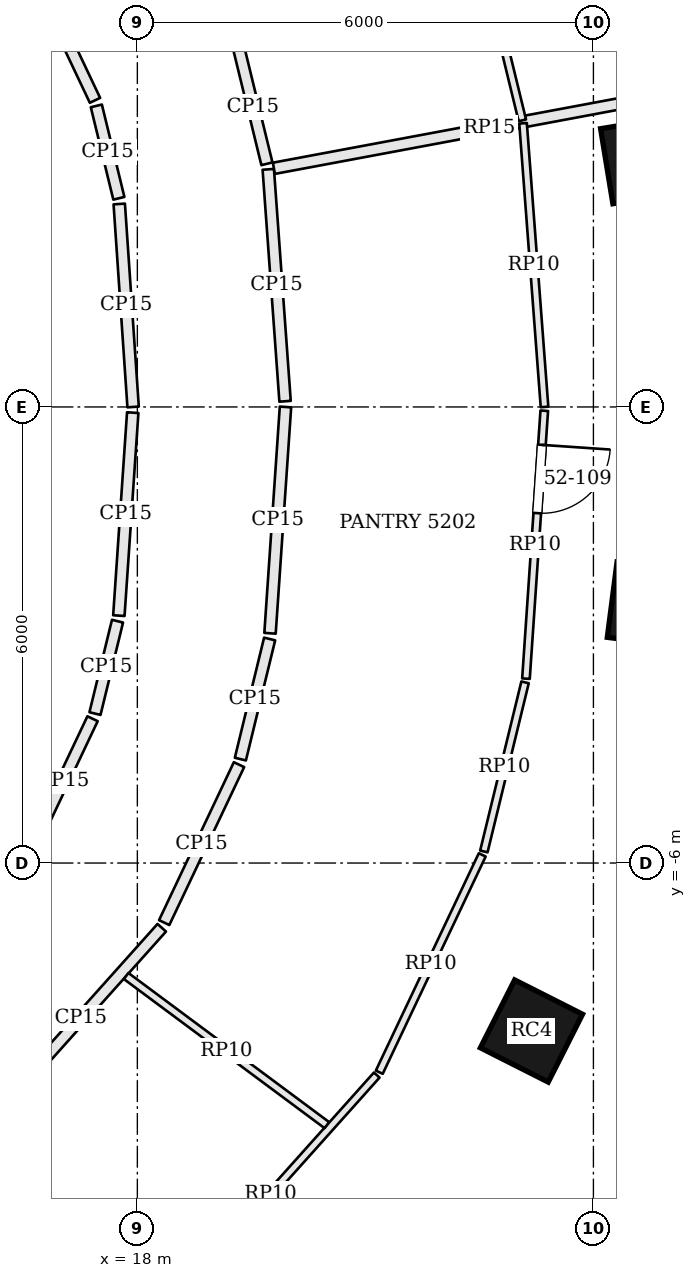
"""IFC4 building model, lengths in metres.
Left out: names, types, materials, properties, quantities, classifications, styles, units other than length and angle.
Written with IfcOpenShell. Run it as: python <this file> out.ifc"""

import sys

from ifc_helpers import new_model, si_unit, direction, frame, frame_2d, origin, origin_2d, place, context, subcontext, project, spatial, rectangle, extrude, element, fill, save


model = new_model("IFC4")
c1 = context("Model", 3, precision=1e-05, world=origin(), true_north=direction((0.0, 1.0)))
c2 = subcontext(c1, "Body", "Model", "MODEL_VIEW")
j1 = project(units=[si_unit("LENGTHUNIT", "METRE"), si_unit("PLANEANGLEUNIT", "RADIAN")], contexts=[c1])
p1 = place(None, origin())
s1 = spatial("IfcSite", under=j1, at=p1, CompositionType="ELEMENT")
p2 = place(p1, origin())
s2 = spatial("IfcBuilding", under=s1, at=p2, CompositionType="ELEMENT")
p3 = place(p2, frame((0.0, 0.0, 213.0)))
s3 = spatial("IfcBuildingStorey", under=s2, at=p3, CompositionType="ELEMENT", Elevation=213.0)
for number, where, z_axis, x_axis in (
    (1, (24.669, 3.248, 0.0), (0.0, 0.0, 1.0), (-0.162, 0.987, 0.0)),
    (2, (23.185, -8.21, 0.0), (0.0, 0.0, 1.0), (0.451, 0.893, 0.0)),
    (3, (24.743, -2.599, 0.0), (0.0, 0.0, 1.0), (0.128, 0.992, 0.0)),
):
    element("IfcColumn", number, at=place(p3, frame(where, z_axis=z_axis, x_axis=x_axis)), inside=s3, PredefinedType="COLUMN", context=c2, shape_type="SweptSolid", body=[
        extrude(rectangle(XDim=1.0, YDim=1.0, at=origin_2d()), origin(), (0.0, 0.0, 1.0), 3.9),
    ])
p4 = place(p3, frame((23.368, -11.701, 0.0), z_axis=(0.0, 0.0, 1.0), x_axis=(0.850251408633, 0.526376806211, 0.0)))
e4 = element("IfcWall", 4, at=p4, inside=s3, PredefinedType="SOLIDWALL", context=c2, shape_type="SweptSolid", body=[
    extrude(rectangle(XDim=5.302, YDim=0.45, at=frame_2d((2.651, 0.0))), origin(), (0.0, 0.0, 1.0), 3.6),
])
p5 = place(p4, frame((1.601, 0.0, 0.9)))
e5 = element("IfcOpeningElement", 5, at=p5, cuts=e4, PredefinedType="OPENING", context=c2, shape_type="SweptSolid", body=[
    extrude(rectangle(XDim=2.1, YDim=1.8, at=frame_2d((1.05, 0.9))), frame((0.0, 0.235, 0.0), z_axis=(0.0, -1.0, 0.0), x_axis=(1.0, 0.0, 0.0)), (0.0, 0.0, 1.0), 0.47),
])
p6 = place(p3, frame((16.193, -9.229, 0.0), z_axis=(0.0, 0.0, 1.0), x_axis=(0.666882089048, 0.745163256815, 0.0)))
e6 = element("IfcWall", 6, at=p6, inside=s3, PredefinedType="PARTITIONING", context=c2, shape_type="SweptSolid", body=[
    extrude(rectangle(XDim=3.19, YDim=0.15, at=frame_2d((1.595, 0.0))), origin(), (0.0, 0.0, 1.0), 2.984),
])
p7 = place(p3, frame((18.353, -6.784, 0.0), z_axis=(0.0, 0.0, 1.0), x_axis=(0.428086344739, 0.903737838894, 0.0)))
e7 = element("IfcWall", 7, at=p7, inside=s3, PredefinedType="PARTITIONING", context=c2, shape_type="SweptSolid", body=[
    extrude(rectangle(XDim=2.3, YDim=0.15, at=frame_2d((1.15, 0.0))), origin(), (0.0, 0.0, 1.0), 2.984),
])
p8 = place(p3, frame((19.355, -4.633, 0.0), z_axis=(0.0, 0.0, 1.0), x_axis=(0.236703930685, 0.971581828359, 0.0)))
e8 = element("IfcWall", 8, at=p8, inside=s3, PredefinedType="PARTITIONING", context=c2, shape_type="SweptSolid", body=[
    extrude(rectangle(XDim=1.626, YDim=0.15, at=frame_2d((0.813, 0.0))), origin(), (0.0, 0.0, 1.0), 2.984),
])
p9 = place(p3, frame((19.745, -2.978, 0.0), z_axis=(0.0, 0.0, 1.0), x_axis=(0.068142324, 0.997675610447, 0.0)))
e9 = element("IfcWall", 9, at=p9, inside=s3, PredefinedType="PARTITIONING", context=c2, shape_type="SweptSolid", body=[
    extrude(rectangle(XDim=2.984, YDim=0.15, at=frame_2d((1.492, 0.0))), origin(), (0.0, 0.0, 1.0), 2.984),
])
p10 = place(p3, frame((19.943, 0.075, 0.0), z_axis=(0.0, 0.0, 1.0), x_axis=(-0.072222486356, 0.997388546387, 0.0)))
e10 = element("IfcWall", 10, at=p10, inside=s3, PredefinedType="PARTITIONING", context=c2, shape_type="SweptSolid", body=[
    extrude(rectangle(XDim=3.059, YDim=0.15, at=frame_2d((1.53, 0.0))), origin(), (0.0, 0.0, 1.0), 2.984),
])
p11 = place(p3, frame((25.467, 4.199, 0.0), z_axis=(0.0, 0.0, 1.0), x_axis=(-0.983002736938, -0.183590901659, 0.0)))
e11 = element("IfcWall", 11, at=p11, inside=s3, PredefinedType="PARTITIONING", context=c2, shape_type="SweptSolid", body=[
    extrude(rectangle(XDim=5.769, YDim=0.15, at=frame_2d((2.884, 0.0))), origin(), (0.0, 0.0, 1.0), 3.084),
])
p12 = place(p3, frame((19.705, 3.199, 0.0), z_axis=(0.0, 0.0, 1.0), x_axis=(-0.23678945494, 0.971560988322, 0.0)))
e12 = element("IfcWall", 12, at=p12, inside=s3, PredefinedType="PARTITIONING", context=c2, shape_type="SweptSolid", body=[
    extrude(rectangle(XDim=1.551, YDim=0.15, at=frame_2d((0.775, 0.0))), origin(), (0.0, 0.0, 1.0), 2.984),
])
p13 = place(p3, frame((16.652, 5.702, 0.0), z_axis=(0.0, 0.0, 1.0), x_axis=(0.428126129773, -0.903718992279, 0.0)))
e13 = element("IfcWall", 13, at=p13, inside=s3, PredefinedType="PARTITIONING", context=c2, shape_type="SweptSolid", body=[
    extrude(rectangle(XDim=1.846, YDim=0.15, at=frame_2d((0.923, 0.0))), origin(), (0.0, 0.0, 1.0), 2.984),
])
p14 = place(p3, frame((17.46, 3.961, 0.0), z_axis=(0.0, 0.0, 1.0), x_axis=(0.236655249498, -0.971593687137, 0.0)))
e14 = element("IfcWall", 14, at=p14, inside=s3, PredefinedType="PARTITIONING", context=c2, shape_type="SweptSolid", body=[
    extrude(rectangle(XDim=1.251, YDim=0.15, at=frame_2d((0.626, 0.0))), origin(), (0.0, 0.0, 1.0), 2.984),
])
p15 = place(p3, frame((17.762, 2.67, 0.0), z_axis=(0.0, 0.0, 1.0), x_axis=(0.068135311644, -0.997676089373, 0.0)))
e15 = element("IfcWall", 15, at=p15, inside=s3, PredefinedType="PARTITIONING", context=c2, shape_type="SweptSolid", body=[
    extrude(rectangle(XDim=2.677, YDim=0.15, at=frame_2d((1.338, 0.0))), origin(), (0.0, 0.0, 1.0), 2.984),
])
p16 = place(p3, frame((17.939, -0.075, 0.0), z_axis=(0.0, 0.0, 1.0), x_axis=(-0.068226099283, -0.99766988497, 0.0)))
e16 = element("IfcWall", 16, at=p16, inside=s3, PredefinedType="PARTITIONING", context=c2, shape_type="SweptSolid", body=[
    extrude(rectangle(XDim=2.677, YDim=0.15, at=frame_2d((1.338, 0.0))), origin(), (0.0, 0.0, 1.0), 2.984),
])
p17 = place(p3, frame((17.739, -2.818, 0.0), z_axis=(0.0, 0.0, 1.0), x_axis=(-0.236884307907, -0.971537865792, 0.0)))
e17 = element("IfcWall", 17, at=p17, inside=s3, PredefinedType="PARTITIONING", context=c2, shape_type="SweptSolid", body=[
    extrude(rectangle(XDim=1.251, YDim=0.15, at=frame_2d((0.625, 0.0))), origin(), (0.0, 0.0, 1.0), 2.984),
])
p18 = place(p3, frame((17.41, -4.102, 0.0), z_axis=(0.0, 0.0, 1.0), x_axis=(-0.428074720318, -0.903743345107, 0.0)))
e18 = element("IfcWall", 18, at=p18, inside=s3, PredefinedType="PARTITIONING", context=c2, shape_type="SweptSolid", body=[
    extrude(rectangle(XDim=1.806, YDim=0.15, at=frame_2d((0.903, 0.0))), origin(), (0.0, 0.0, 1.0), 2.984),
])
p19 = place(p3, frame((23.074, 3.732, 0.0), z_axis=(0.0, 0.0, 1.0), x_axis=(0.075479196263, -0.997147376736, 0.0)))
e19 = element("IfcWall", 19, at=p19, inside=s3, PredefinedType="PARTITIONING", context=c2, shape_type="SweptSolid", body=[
    extrude(rectangle(XDim=3.742, YDim=0.1, at=frame_2d((1.871, 0.0))), origin(), (0.0, 0.0, 1.0), 2.984),
])
p20 = place(p3, frame((23.354, -0.05, 0.0), z_axis=(0.0, 0.0, 1.0), x_axis=(-0.06820679361, -0.99767120501, 0.0)))
e20 = element("IfcWall", 20, at=p20, inside=s3, PredefinedType="PARTITIONING", context=c2, shape_type="SweptSolid", body=[
    extrude(rectangle(XDim=3.533, YDim=0.1, at=frame_2d((1.767, 0.0))), origin(), (0.0, 0.0, 1.0), 2.984),
])
p21 = place(p20, frame((0.45, 0.0, 0.0)))
e21 = element("IfcOpeningElement", 21, at=p21, cuts=e20, PredefinedType="OPENING", context=c2, shape_type="SweptSolid", body=[
    extrude(rectangle(XDim=0.9, YDim=2.1, at=frame_2d((0.45, 1.05))), frame((0.0, 0.06, 0.0), z_axis=(0.0, -1.0, 0.0), x_axis=(1.0, 0.0, 0.0)), (0.0, 0.0, 1.0), 0.12),
])
p22 = place(p3, frame((23.101, -3.623, 0.0), z_axis=(0.0, 0.0, 1.0), x_axis=(-0.236811358433, -0.971555649727, 0.0)))
e22 = element("IfcWall", 22, at=p22, inside=s3, PredefinedType="PARTITIONING", context=c2, shape_type="SweptSolid", body=[
    extrude(rectangle(XDim=2.29, YDim=0.1, at=frame_2d((1.145, 0.0))), origin(), (0.0, 0.0, 1.0), 2.984),
])
p23 = place(p3, frame((22.537, -5.893, 0.0), z_axis=(0.0, 0.0, 1.0), x_axis=(-0.428099612517, -0.903731554037, 0.0)))
e23 = element("IfcWall", 23, at=p23, inside=s3, PredefinedType="PARTITIONING", context=c2, shape_type="SweptSolid", body=[
    extrude(rectangle(XDim=3.164, YDim=0.1, at=frame_2d((1.582, 0.0))), origin(), (0.0, 0.0, 1.0), 2.984),
])
p24 = place(p3, frame((21.149, -8.789, 0.0), z_axis=(0.0, 0.0, 1.0), x_axis=(-0.666915902537, -0.745132994132, 0.0)))
e24 = element("IfcWall", 24, at=p24, inside=s3, PredefinedType="PARTITIONING", context=c2, shape_type="SweptSolid", body=[
    extrude(rectangle(XDim=4.186, YDim=0.1, at=frame_2d((2.093, 0.0))), origin(), (0.0, 0.0, 1.0), 2.984),
])
p25 = place(p3, frame((17.853, -7.487, 0.0), z_axis=(0.0, 0.0, 1.0), x_axis=(0.802681916891, -0.596407361034, 0.0)))
e25 = element("IfcWall", 25, at=p25, inside=s3, PredefinedType="PARTITIONING", context=c2, shape_type="SweptSolid", body=[
    extrude(rectangle(XDim=3.289, YDim=0.1, at=frame_2d((1.645, 0.0))), origin(), (0.0, 0.0, 1.0), 2.984),
])
p26 = place(p3, frame((22.57, 5.799, 0.0), z_axis=(0.0, 0.0, 1.0), x_axis=(0.236808111838, -0.971556441061, 0.0)))
e26 = element("IfcWall", 26, at=p26, inside=s3, PredefinedType="PARTITIONING", context=c2, shape_type="SweptSolid", body=[
    extrude(rectangle(XDim=2.088, YDim=0.1, at=frame_2d((1.044, 0.0))), origin(), (0.0, 0.0, 1.0), 2.984),
])
p27 = place(p21, origin())
e27 = element("IfcDoor", 27, at=p27, inside=s3, OperationType="SINGLE_SWING_LEFT", PredefinedType="DOOR", context=c2, shape_type="SweptSolid", body=[
    extrude(rectangle(XDim=0.9, YDim=2.1, at=frame_2d((0.45, 1.05))), frame((0.0, 0.025, 0.0), z_axis=(0.0, -1.0, 0.0), x_axis=(1.0, 0.0, 0.0)), (0.0, 0.0, 1.0), 0.05),
])
fill(e21, e27)
save(model, sys.argv[1])
